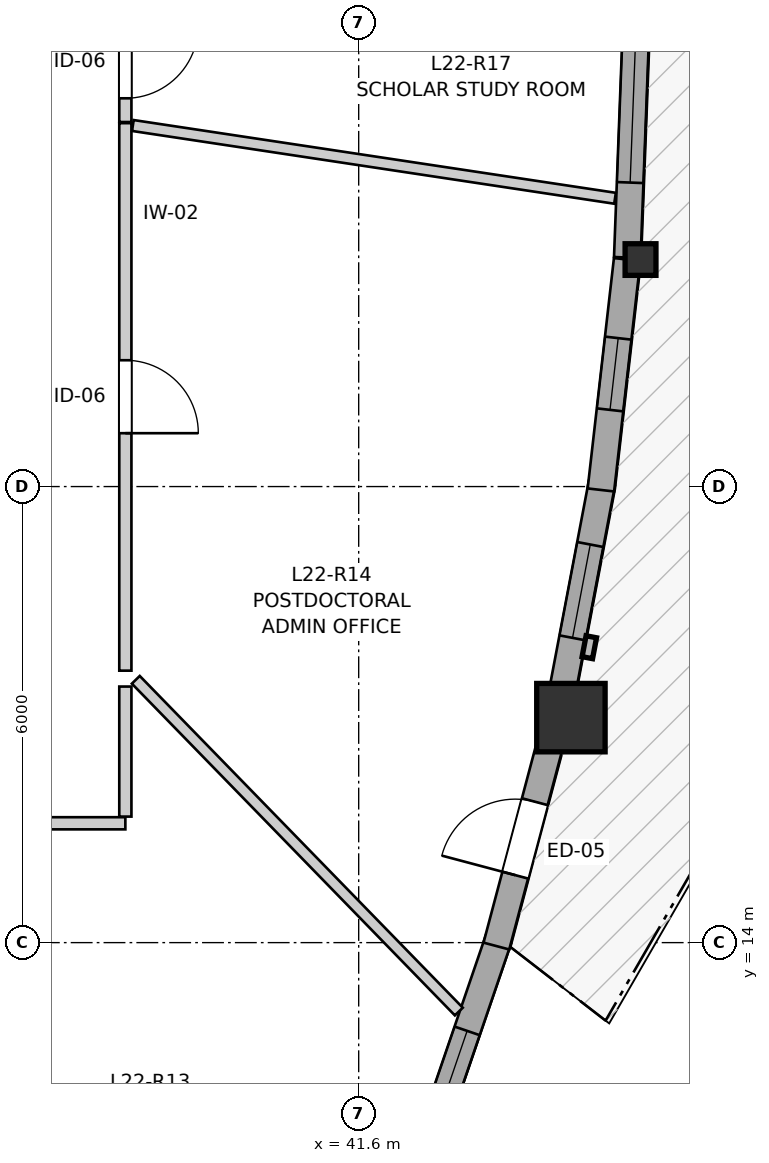
"""IFC4 building model, lengths in metres.
Left out: names, types, materials, properties, quantities, classifications, styles, units other than length and angle.
Written with IfcOpenShell. Run it as: python <this file> out.ifc"""

import sys

from ifc_helpers import new_model, si_unit, direction, frame, frame_2d, origin, origin_2d, place, context, subcontext, project, spatial, rectangle, i_section, extrude, source, transform, mapped, element, fill, save


model = new_model("IFC4")
c1 = context("Model", 3, precision=1e-05, world=origin(), true_north=direction((0.0, 1.0)))
c2 = subcontext(c1, "Body", "Model", "MODEL_VIEW")
j1 = project(units=[si_unit("LENGTHUNIT", "METRE"), si_unit("PLANEANGLEUNIT", "RADIAN")], contexts=[c1])
p1 = place(None, origin())
s1 = spatial("IfcSite", under=j1, at=p1, CompositionType="ELEMENT")
p2 = place(p1, origin())
s2 = spatial("IfcBuilding", under=s1, at=p2, CompositionType="ELEMENT")
p3 = place(p2, frame((0.0, 0.0, 76.8)))
s3 = spatial("IfcBuildingStorey", under=s2, at=p3, CompositionType="ELEMENT", Elevation=76.8)
m1 = source(origin(), c2, "Body", "SweptSolid", [
    extrude(rectangle(XDim=0.9, YDim=0.9, at=origin_2d()), origin(), (0.0, 0.0, 1.0), 2.935),
])
p4 = place(p3, frame((44.392, 16.96, 0.0), z_axis=(0.0, 0.0, 1.0), x_axis=(1.0, 0.0, 0.0)))
e1 = element("IfcColumn", 1, at=p4, inside=s3, PredefinedType="COLUMN", context=c2, shape_type="MappedRepresentation", body=[
    mapped(m1, transform((0.0, 0.0, 0.0), x_axis=(1.0, 0.0, 0.0), y_axis=(0.0, 1.0, 0.0), z_axis=(0.0, 0.0, 1.0), scale=1.0)),
])
m2 = source(origin(), c2, "Body", "SweptSolid", [
    extrude(i_section(OverallWidth=0.406, OverallDepth=0.416, WebThickness=0.027, FlangeThickness=0.044, FilletRadius=0.015, at=origin_2d()), origin(), (0.0, 0.0, 1.0), 2.935),
])
p5 = place(p3, frame((45.308, 22.987, 0.0), z_axis=(0.0, 0.0, 1.0), x_axis=(1.0, 0.0, 0.0)))
e2 = element("IfcColumn", 2, at=p5, inside=s3, PredefinedType="PILASTER", context=c2, shape_type="MappedRepresentation", body=[
    mapped(m2, transform((0.0, 0.0, 0.0), x_axis=(1.0, 0.0, 0.0), y_axis=(0.0, 1.0, 0.0), z_axis=(0.0, 0.0, 1.0), scale=1.0)),
])
p6 = place(p3, frame((42.401, 11.009, 0.0), z_axis=(0.0, 0.0, 1.0), x_axis=(0.323605065536, 0.946192243447, 0.0)))
e3 = element("IfcWall", 3, at=p6, inside=s3, PredefinedType="SOLIDWALL", context=c2, shape_type="SweptSolid", body=[
    extrude(rectangle(XDim=3.203, YDim=0.35, at=frame_2d((1.601, 0.0))), origin(), (0.0, 0.0, 1.0), 2.465),
])
p7 = place(p6, frame((0.334, 0.0, 0.82)))
e4 = element("IfcOpeningElement", 4, at=p7, cuts=e3, PredefinedType="OPENING", context=c2, shape_type="SweptSolid", body=[
    extrude(rectangle(XDim=1.6, YDim=1.35, at=frame_2d((0.8, 0.675))), frame((0.0, 0.185, 0.0), z_axis=(0.0, -1.0, 0.0), x_axis=(1.0, 0.0, 0.0)), (0.0, 0.0, 1.0), 0.37),
])
p8 = place(p3, frame((43.412, 13.955, 0.0), z_axis=(0.0, 0.0, 1.0), x_axis=(0.257050841376, 0.966397881283, 0.0)))
e5 = element("IfcWall", 5, at=p8, inside=s3, PredefinedType="SOLIDWALL", context=c2, shape_type="SweptSolid", body=[
    extrude(rectangle(XDim=2.931, YDim=0.35, at=frame_2d((1.465, 0.0))), origin(), (0.0, 0.0, 1.0), 2.465),
])
p9 = place(p8, frame((0.966, 0.0, 0.0)))
e6 = element("IfcOpeningElement", 6, at=p9, cuts=e5, PredefinedType="OPENING", context=c2, shape_type="SweptSolid", body=[
    extrude(rectangle(XDim=1.0, YDim=2.1, at=frame_2d((0.5, 1.05))), frame((0.0, 0.185, 0.0), z_axis=(0.0, -1.0, 0.0), x_axis=(1.0, 0.0, 0.0)), (0.0, 0.0, 1.0), 0.37),
])
p10 = place(p3, frame((44.262, 17.214, 0.0), z_axis=(0.0, 0.0, 1.0), x_axis=(0.18665246466, 0.982426006087, 0.0)))
e7 = element("IfcWall", 7, at=p10, inside=s3, PredefinedType="SOLIDWALL", context=c2, shape_type="SweptSolid", body=[
    extrude(rectangle(XDim=2.88, YDim=0.35, at=frame_2d((1.44, 0.0))), origin(), (0.0, 0.0, 1.0), 2.465),
])
p11 = place(p10, frame((0.81, 0.0, 0.82)))
e8 = element("IfcOpeningElement", 8, at=p11, cuts=e7, PredefinedType="OPENING", context=c2, shape_type="SweptSolid", body=[
    extrude(rectangle(XDim=1.25, YDim=1.35, at=frame_2d((0.625, 0.675))), frame((0.0, 0.185, 0.0), z_axis=(0.0, -1.0, 0.0), x_axis=(1.0, 0.0, 0.0)), (0.0, 0.0, 1.0), 0.37),
])
p12 = place(p3, frame((44.787, 19.955, 0.0), z_axis=(0.0, 0.0, 1.0), x_axis=(0.113232876367, 0.993568475602, 0.0)))
e9 = element("IfcWall", 9, at=p12, inside=s3, PredefinedType="SOLIDWALL", context=c2, shape_type="SweptSolid", body=[
    extrude(rectangle(XDim=3.051, YDim=0.35, at=frame_2d((1.525, 0.0))), origin(), (0.0, 0.0, 1.0), 2.465),
])
p13 = place(p12, frame((1.06, 0.0, 0.82)))
e10 = element("IfcOpeningElement", 10, at=p13, cuts=e9, PredefinedType="OPENING", context=c2, shape_type="SweptSolid", body=[
    extrude(rectangle(XDim=0.95, YDim=1.35, at=frame_2d((0.475, 0.675))), frame((0.0, 0.185, 0.0), z_axis=(0.0, -1.0, 0.0), x_axis=(1.0, 0.0, 0.0)), (0.0, 0.0, 1.0), 0.37),
])
p14 = place(p3, frame((45.134, 23.013, 0.0), z_axis=(0.0, 0.0, 1.0), x_axis=(0.037984969205, 0.999278310639, 0.0)))
e11 = element("IfcWall", 11, at=p14, inside=s3, PredefinedType="SOLIDWALL", context=c2, shape_type="SweptSolid", body=[
    extrude(rectangle(XDim=3.034, YDim=0.35, at=frame_2d((1.517, 0.0))), origin(), (0.0, 0.0, 1.0), 2.465),
])
p15 = place(p14, frame((0.987, 0.0, 0.82)))
e12 = element("IfcOpeningElement", 12, at=p15, cuts=e11, PredefinedType="OPENING", context=c2, shape_type="SweptSolid", body=[
    extrude(rectangle(XDim=1.75, YDim=1.3, at=frame_2d((0.875, 0.65))), frame((0.0, 0.185, 0.0), z_axis=(0.0, -1.0, 0.0), x_axis=(1.0, 0.0, 0.0)), (0.0, 0.0, 1.0), 0.37),
])
p16 = place(p3, frame((38.53, 24.781, 0.0), z_axis=(0.0, 0.0, 1.0), x_axis=(0.0, -1.0, 0.0)))
e13 = element("IfcWall", 13, at=p16, inside=s3, PredefinedType="PARTITIONING", context=c2, shape_type="SweptSolid", body=[
    extrude(rectangle(XDim=7.203, YDim=0.16, at=frame_2d((3.602, 0.0))), origin(), (0.0, 0.0, 1.0), 2.935),
])
p17 = place(p16, frame((3.119, 0.0, 0.0)))
e14 = element("IfcOpeningElement", 14, at=p17, cuts=e13, PredefinedType="OPENING", context=c2, shape_type="SweptSolid", body=[
    extrude(rectangle(XDim=0.96, YDim=2.1, at=frame_2d((0.48, 1.05))), frame((0.0, 0.09, 0.0), z_axis=(0.0, -1.0, 0.0), x_axis=(1.0, 0.0, 0.0)), (0.0, 0.0, 1.0), 0.18),
])
p18 = place(p3, frame((38.53, 15.57, 0.0), z_axis=(0.0, 0.0, 1.0), x_axis=(-1.0, 0.0, 0.0)))
e15 = element("IfcWall", 15, at=p18, inside=s3, PredefinedType="PARTITIONING", context=c2, shape_type="SweptSolid", body=[
    extrude(rectangle(XDim=4.412, YDim=0.16, at=frame_2d((2.206, 0.0))), origin(), (0.0, 0.0, 1.0), 2.935),
])
p19 = place(p18, frame((1.718, 0.0, 0.0)))
e16 = element("IfcOpeningElement", 16, at=p19, cuts=e15, PredefinedType="OPENING", context=c2, shape_type="SweptSolid", body=[
    extrude(rectangle(XDim=0.96, YDim=2.1, at=frame_2d((0.48, 1.05))), frame((0.0, 0.09, 0.0), z_axis=(0.0, -1.0, 0.0), x_axis=(1.0, 0.0, 0.0)), (0.0, 0.0, 1.0), 0.18),
])
p20 = place(p3, frame((38.53, 26.381, 0.0), z_axis=(0.0, 0.0, 1.0), x_axis=(0.0, -1.0, 0.0)))
e17 = element("IfcWall", 17, at=p20, inside=s3, PredefinedType="PARTITIONING", context=c2, shape_type="SweptSolid", body=[
    extrude(rectangle(XDim=1.585, YDim=0.16, at=frame_2d((0.792, 0.0))), origin(), (0.0, 0.0, 1.0), 2.935),
])
p21 = place(p20, frame((0.313, 0.0, 0.0)))
e18 = element("IfcOpeningElement", 18, at=p21, cuts=e17, PredefinedType="OPENING", context=c2, shape_type="SweptSolid", body=[
    extrude(rectangle(XDim=0.96, YDim=2.1, at=frame_2d((0.48, 1.05))), frame((0.0, 0.09, 0.0), z_axis=(0.0, -1.0, 0.0), x_axis=(1.0, 0.0, 0.0)), (0.0, 0.0, 1.0), 0.18),
])
p22 = place(p3, frame((34.175, 15.458, 0.0), z_axis=(0.0, 0.0, 1.0), x_axis=(0.341079223998, -0.940034554129, 0.0)))
e19 = element("IfcWall", 19, at=p22, inside=s3, PredefinedType="PARTITIONING", context=c2, shape_type="SweptSolid", body=[
    extrude(rectangle(XDim=10.484, YDim=0.145, at=frame_2d((5.242, 0.0))), origin(), (0.0, 0.0, 1.0), 2.935),
])
p23 = place(p3, frame((38.629, 24.75, 0.0), z_axis=(0.0, 0.0, 1.0), x_axis=(0.988806184902, -0.149205659073, 0.0)))
e20 = element("IfcWall", 20, at=p23, inside=s3, PredefinedType="PARTITIONING", context=c2, shape_type="SweptSolid", body=[
    extrude(rectangle(XDim=6.416, YDim=0.145, at=frame_2d((3.208, 0.0))), origin(), (0.0, 0.0, 1.0), 2.935),
])
p24 = place(p3, frame((38.667, 17.458, 0.0), z_axis=(0.0, 0.0, 1.0), x_axis=(0.697626427609, -0.716461699954, 0.0)))
e21 = element("IfcWall", 21, at=p24, inside=s3, PredefinedType="PARTITIONING", context=c2, shape_type="SweptSolid", body=[
    extrude(rectangle(XDim=6.092, YDim=0.145, at=frame_2d((3.046, 0.0))), origin(), (0.0, 0.0, 1.0), 2.935),
])
p25 = place(p3, frame((38.53, 15.658, 0.0), z_axis=(0.0, 0.0, 1.0), x_axis=(0.0, 1.0, 0.0)))
e22 = element("IfcWall", 22, at=p25, inside=s3, PredefinedType="PARTITIONING", context=c2, shape_type="SweptSolid", body=[
    extrude(rectangle(XDim=1.711, YDim=0.16, at=frame_2d((0.855, 0.0))), origin(), (0.0, 0.0, 1.0), 2.935),
])
m3 = source(origin(), c2, "Body", "SweptSolid", [
    extrude(rectangle(XDim=1.6, YDim=1.35, at=frame_2d((0.8, 0.675))), frame((0.0, 0.03, 0.0), z_axis=(0.0, -1.0, 0.0), x_axis=(1.0, 0.0, 0.0)), (0.0, 0.0, 1.0), 0.06),
])
p26 = place(p7, origin())
e23 = element("IfcWindow", 23, at=p26, inside=s3, PartitioningType="SINGLE_PANEL", PredefinedType="WINDOW", context=c2, shape_type="MappedRepresentation", body=[
    mapped(m3, transform((0.0, 0.0, 0.0), x_axis=(1.0, 0.0, 0.0), y_axis=(0.0, 1.0, 0.0), z_axis=(0.0, 0.0, 1.0), scale=1.0)),
])
fill(e4, e23)
m4 = source(origin(), c2, "Body", "SweptSolid", [
    extrude(rectangle(XDim=1.25, YDim=1.35, at=frame_2d((0.625, 0.675))), frame((0.0, 0.03, 0.0), z_axis=(0.0, -1.0, 0.0), x_axis=(1.0, 0.0, 0.0)), (0.0, 0.0, 1.0), 0.06),
])
p27 = place(p11, origin())
e24 = element("IfcWindow", 24, at=p27, inside=s3, PartitioningType="SINGLE_PANEL", PredefinedType="WINDOW", context=c2, shape_type="MappedRepresentation", body=[
    mapped(m4, transform((0.0, 0.0, 0.0), x_axis=(1.0, 0.0, 0.0), y_axis=(0.0, 1.0, 0.0), z_axis=(0.0, 0.0, 1.0), scale=1.0)),
])
fill(e8, e24)
m5 = source(origin(), c2, "Body", "SweptSolid", [
    extrude(rectangle(XDim=0.95, YDim=1.35, at=frame_2d((0.475, 0.675))), frame((0.0, 0.03, 0.0), z_axis=(0.0, -1.0, 0.0), x_axis=(1.0, 0.0, 0.0)), (0.0, 0.0, 1.0), 0.06),
])
p28 = place(p13, origin())
e25 = element("IfcWindow", 25, at=p28, inside=s3, PartitioningType="SINGLE_PANEL", PredefinedType="WINDOW", context=c2, shape_type="MappedRepresentation", body=[
    mapped(m5, transform((0.0, 0.0, 0.0), x_axis=(1.0, 0.0, 0.0), y_axis=(0.0, 1.0, 0.0), z_axis=(0.0, 0.0, 1.0), scale=1.0)),
])
fill(e10, e25)
m6 = source(origin(), c2, "Body", "SweptSolid", [
    extrude(rectangle(XDim=1.75, YDim=1.3, at=frame_2d((0.875, 0.65))), frame((0.0, 0.03, 0.0), z_axis=(0.0, -1.0, 0.0), x_axis=(1.0, 0.0, 0.0)), (0.0, 0.0, 1.0), 0.06),
])
p29 = place(p15, origin())
e26 = element("IfcWindow", 26, at=p29, inside=s3, PartitioningType="SINGLE_PANEL", PredefinedType="WINDOW", context=c2, shape_type="MappedRepresentation", body=[
    mapped(m6, transform((0.0, 0.0, 0.0), x_axis=(1.0, 0.0, 0.0), y_axis=(0.0, 1.0, 0.0), z_axis=(0.0, 0.0, 1.0), scale=1.0)),
])
fill(e12, e26)
m7 = source(origin(), c2, "Body", "SweptSolid", [
    extrude(rectangle(XDim=1.0, YDim=2.1, at=frame_2d((0.5, 1.05))), frame((0.0, 0.025, 0.0), z_axis=(0.0, -1.0, 0.0), x_axis=(1.0, 0.0, 0.0)), (0.0, 0.0, 1.0), 0.05),
])
p30 = place(p9, origin())
e27 = element("IfcDoor", 27, at=p30, inside=s3, OperationType="SINGLE_SWING_LEFT", PredefinedType="DOOR", context=c2, shape_type="MappedRepresentation", body=[
    mapped(m7, transform((0.0, 0.0, 0.0), x_axis=(1.0, 0.0, 0.0), y_axis=(0.0, 1.0, 0.0), z_axis=(0.0, 0.0, 1.0), scale=1.0)),
])
fill(e6, e27)
m8 = source(origin(), c2, "Body", "SweptSolid", [
    extrude(rectangle(XDim=0.96, YDim=2.1, at=frame_2d((0.48, 1.05))), frame((0.0, 0.025, 0.0), z_axis=(0.0, -1.0, 0.0), x_axis=(1.0, 0.0, 0.0)), (0.0, 0.0, 1.0), 0.05),
])
p31 = place(p17, origin())
e28 = element("IfcDoor", 28, at=p31, inside=s3, OperationType="SINGLE_SWING_RIGHT", PredefinedType="DOOR", context=c2, shape_type="MappedRepresentation", body=[
    mapped(m8, transform((0.0, 0.0, 0.0), x_axis=(1.0, 0.0, 0.0), y_axis=(0.0, 1.0, 0.0), z_axis=(0.0, 0.0, 1.0), scale=1.0)),
])
fill(e14, e28)
p32 = place(p21, origin())
e29 = element("IfcDoor", 29, at=p32, inside=s3, OperationType="SINGLE_SWING_LEFT", PredefinedType="DOOR", context=c2, shape_type="MappedRepresentation", body=[
    mapped(m8, transform((0.0, 0.0, 0.0), x_axis=(1.0, 0.0, 0.0), y_axis=(0.0, 1.0, 0.0), z_axis=(0.0, 0.0, 1.0), scale=1.0)),
])
fill(e18, e29)
save(model, sys.argv[1])
